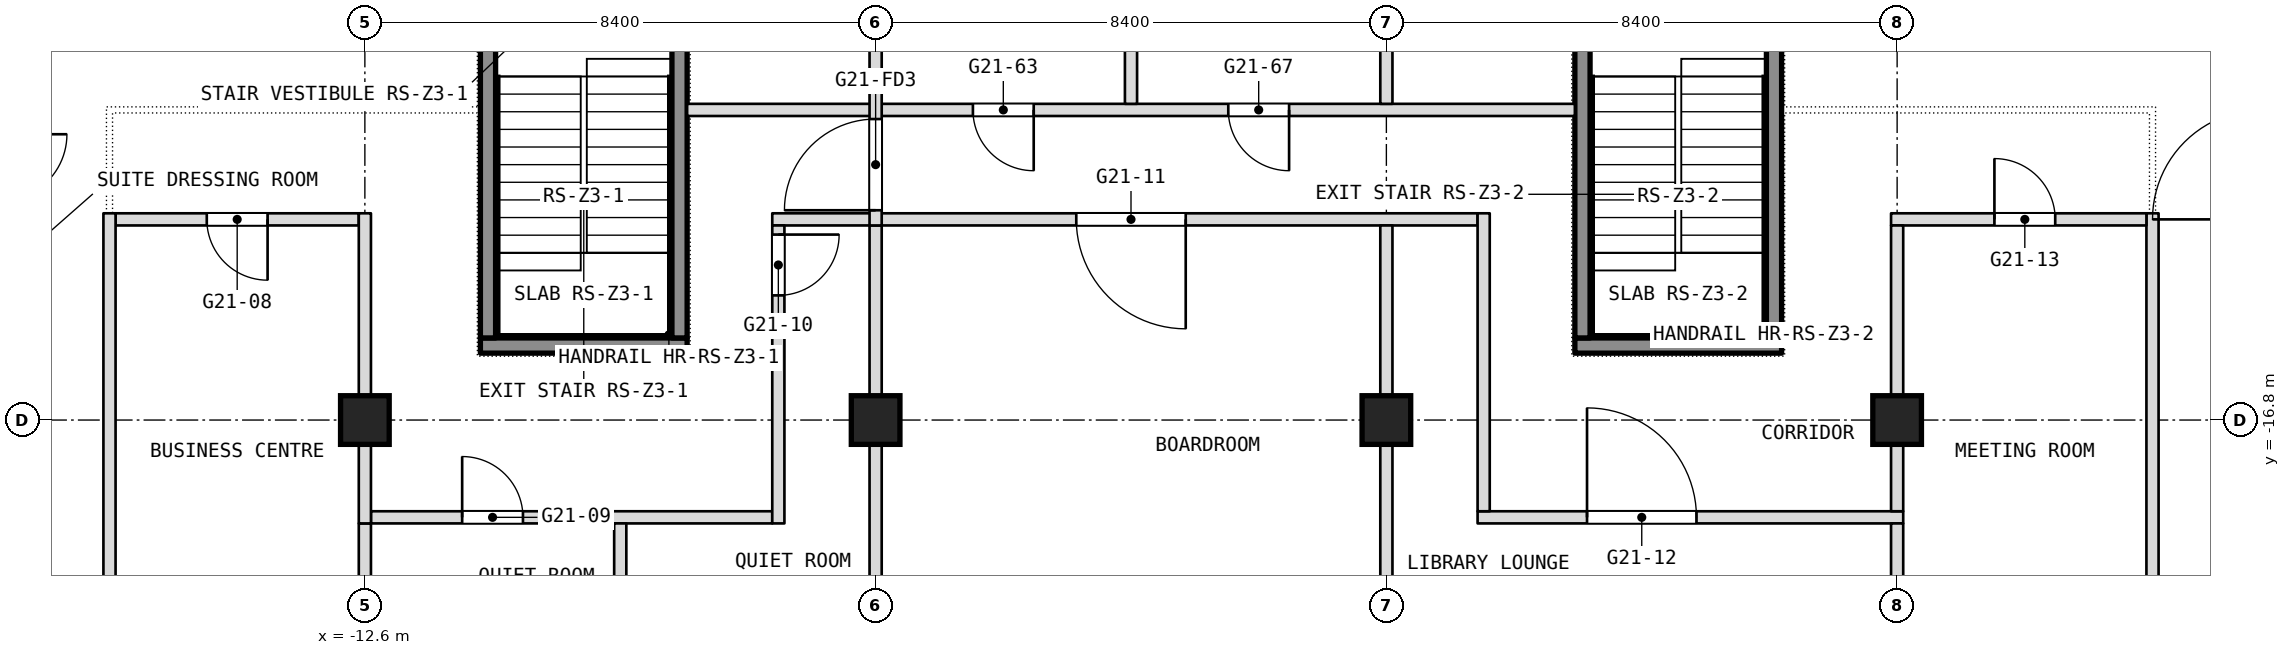
"""IFC4 building model, lengths in metres.
Left out: names, types, materials, properties, quantities, classifications, styles, units other than length and angle.
Written with IfcOpenShell. Run it as: python <this file> out.ifc"""

import sys

from ifc_helpers import new_model, si_unit, direction, frame, frame_2d, origin, origin_2d, place, context, subcontext, project, spatial, rectangle, extrude, element, fill, save


model = new_model("IFC4")
c1 = context("Model", 3, precision=1e-05, world=origin(), true_north=direction((0.0, 1.0)))
c2 = subcontext(c1, "Body", "Model", "MODEL_VIEW")
j1 = project(units=[si_unit("LENGTHUNIT", "METRE"), si_unit("PLANEANGLEUNIT", "RADIAN")], contexts=[c1])
p1 = place(None, origin())
s1 = spatial("IfcSite", under=j1, at=p1, CompositionType="ELEMENT")
p2 = place(p1, origin())
s2 = spatial("IfcBuilding", under=s1, at=p2, CompositionType="ELEMENT")
p3 = place(p2, frame((0.0, 0.0, 241.7)))
s3 = spatial("IfcBuildingStorey", under=s2, at=p3, CompositionType="ELEMENT", Elevation=241.7)
for number, where, z_axis, x_axis in (
    (1, (-12.6, -16.8, 0.0), (0.0, 0.0, 1.0), (1.0, 0.0, 0.0)),
    (2, (-4.2, -16.8, 0.0), (0.0, 0.0, 1.0), (1.0, 0.0, 0.0)),
    (3, (4.2, -16.8, 0.0), (0.0, 0.0, 1.0), (1.0, 0.0, 0.0)),
    (4, (12.6, -16.8, 0.0), (0.0, 0.0, 1.0), (1.0, 0.0, 0.0)),
):
    element("IfcColumn", number, at=place(p3, frame(where, z_axis=z_axis, x_axis=x_axis)), inside=s3, PredefinedType="COLUMN", context=c2, shape_type="SweptSolid", body=[
        extrude(rectangle(XDim=0.8, YDim=0.8, at=origin_2d()), origin(), (0.0, 0.0, 1.0), 3.6),
    ])
p4 = place(p3, frame((-12.5, -18.4, 0.0), z_axis=(0.0, 0.0, 1.0), x_axis=(1.0, 0.0, 0.0)))
e5 = element("IfcWall", 5, at=p4, inside=s3, PredefinedType="PARTITIONING", context=c2, shape_type="SweptSolid", body=[
    extrude(rectangle(XDim=6.6, YDim=0.2, at=frame_2d((3.3, 0.0))), origin(), (0.0, 0.0, 1.0), 3.34),
])
p5 = place(p4, frame((1.5, 0.0, 0.0)))
e6 = element("IfcOpeningElement", 6, at=p5, cuts=e5, PredefinedType="OPENING", context=c2, shape_type="SweptSolid", body=[
    extrude(rectangle(XDim=1.0, YDim=2.1, at=frame_2d((0.5, 1.05))), frame((0.0, 0.1, 0.0), z_axis=(0.0, -1.0, 0.0), x_axis=(1.0, 0.0, 0.0)), (0.0, 0.0, 1.0), 0.2),
])
p6 = place(p3, frame((5.7, -18.4, 0.0), z_axis=(0.0, 0.0, 1.0), x_axis=(1.0, 0.0, 0.0)))
e7 = element("IfcWall", 7, at=p6, inside=s3, PredefinedType="PARTITIONING", context=c2, shape_type="SweptSolid", body=[
    extrude(rectangle(XDim=7.0, YDim=0.2, at=frame_2d((3.5, 0.0))), origin(), (0.0, 0.0, 1.0), 3.34),
])
p7 = place(p6, frame((1.8, 0.0, 0.0)))
e8 = element("IfcOpeningElement", 8, at=p7, cuts=e7, PredefinedType="OPENING", context=c2, shape_type="SweptSolid", body=[
    extrude(rectangle(XDim=1.8, YDim=2.1, at=frame_2d((0.9, 1.05))), frame((0.0, 0.1, 0.0), z_axis=(0.0, -1.0, 0.0), x_axis=(1.0, 0.0, 0.0)), (0.0, 0.0, 1.0), 0.2),
])
p8 = place(p3, frame((16.8, -20.2, 0.0), z_axis=(0.0, 0.0, 1.0), x_axis=(0.0, 1.0, 0.0)))
e9 = element("IfcWall", 9, at=p8, inside=s3, PredefinedType="PARTITIONING", context=c2, shape_type="SweptSolid", body=[
    extrude(rectangle(XDim=6.8, YDim=0.2, at=frame_2d((3.4, 0.0))), origin(), (0.0, 0.0, 1.0), 3.34),
])
p9 = place(p3, frame((-16.7, -13.5, 0.0), z_axis=(0.0, 0.0, 1.0), x_axis=(1.0, 0.0, 0.0)))
e10 = element("IfcWall", 10, at=p9, inside=s3, PredefinedType="PARTITIONING", context=c2, shape_type="SweptSolid", body=[
    extrude(rectangle(XDim=4.0, YDim=0.2, at=frame_2d((2.0, 0.0))), origin(), (0.0, 0.0, 1.0), 3.34),
])
p10 = place(p9, frame((1.5, 0.0, 0.0)))
e11 = element("IfcOpeningElement", 11, at=p10, cuts=e10, PredefinedType="OPENING", context=c2, shape_type="SweptSolid", body=[
    extrude(rectangle(XDim=1.0, YDim=2.1, at=frame_2d((0.5, 1.05))), frame((0.0, 0.1, 0.0), z_axis=(0.0, -1.0, 0.0), x_axis=(1.0, 0.0, 0.0)), (0.0, 0.0, 1.0), 0.2),
])
p11 = place(p3, frame((-5.9, -13.5, 0.0), z_axis=(0.0, 0.0, 1.0), x_axis=(1.0, 0.0, 0.0)))
e12 = element("IfcWall", 12, at=p11, inside=s3, PredefinedType="PARTITIONING", context=c2, shape_type="SweptSolid", body=[
    extrude(rectangle(XDim=11.6, YDim=0.2, at=frame_2d((5.8, 0.0))), origin(), (0.0, 0.0, 1.0), 3.34),
])
p12 = place(p11, frame((5.0, 0.0, 0.0)))
e13 = element("IfcOpeningElement", 13, at=p12, cuts=e12, PredefinedType="OPENING", context=c2, shape_type="SweptSolid", body=[
    extrude(rectangle(XDim=1.8, YDim=2.1, at=frame_2d((0.9, 1.05))), frame((0.0, 0.1, 0.0), z_axis=(0.0, -1.0, 0.0), x_axis=(1.0, 0.0, 0.0)), (0.0, 0.0, 1.0), 0.2),
])
p13 = place(p3, frame((12.5, -13.5, 0.0), z_axis=(0.0, 0.0, 1.0), x_axis=(1.0, 0.0, 0.0)))
e14 = element("IfcWall", 14, at=p13, inside=s3, PredefinedType="PARTITIONING", context=c2, shape_type="SweptSolid", body=[
    extrude(rectangle(XDim=4.2, YDim=0.2, at=frame_2d((2.1, 0.0))), origin(), (0.0, 0.0, 1.0), 3.34),
])
p14 = place(p13, frame((1.7, 0.0, 0.0)))
e15 = element("IfcOpeningElement", 15, at=p14, cuts=e14, PredefinedType="OPENING", context=c2, shape_type="SweptSolid", body=[
    extrude(rectangle(XDim=1.0, YDim=2.1, at=frame_2d((0.5, 1.05))), frame((0.0, 0.1, 0.0), z_axis=(0.0, -1.0, 0.0), x_axis=(1.0, 0.0, 0.0)), (0.0, 0.0, 1.0), 0.2),
])
p15 = place(p3, frame((12.6, -20.0, 0.0), z_axis=(0.0, 0.0, 1.0), x_axis=(0.0, 1.0, 0.0)))
e16 = element("IfcWall", 16, at=p15, inside=s3, PredefinedType="PARTITIONING", context=c2, shape_type="SweptSolid", body=[
    extrude(rectangle(XDim=1.5, YDim=0.2, at=frame_2d((0.75, 0.0))), origin(), (0.0, 0.0, 1.0), 3.34),
])
p16 = place(p3, frame((12.6, -18.3, 0.0), z_axis=(0.0, 0.0, 1.0), x_axis=(0.0, 1.0, 0.0)))
e17 = element("IfcWall", 17, at=p16, inside=s3, PredefinedType="PARTITIONING", context=c2, shape_type="SweptSolid", body=[
    extrude(rectangle(XDim=4.7, YDim=0.2, at=frame_2d((2.35, 0.0))), origin(), (0.0, 0.0, 1.0), 3.34),
])
p17 = place(p3, frame((-7.3, -11.7, 0.0), z_axis=(0.0, 0.0, 1.0), x_axis=(1.0, 0.0, 0.0)))
e18 = element("IfcWall", 18, at=p17, inside=s3, PredefinedType="PARTITIONING", context=c2, shape_type="SweptSolid", body=[
    extrude(rectangle(XDim=14.6, YDim=0.2, at=frame_2d((7.3, 0.0))), origin(), (0.0, 0.0, 1.0), 3.34),
])
p18 = place(p17, frame((4.7, 0.0, 0.0)))
e19 = element("IfcOpeningElement", 19, at=p18, cuts=e18, PredefinedType="OPENING", context=c2, shape_type="SweptSolid", body=[
    extrude(rectangle(XDim=1.0, YDim=2.1, at=frame_2d((0.5, 1.05))), frame((0.0, 0.1, 0.0), z_axis=(0.0, -1.0, 0.0), x_axis=(1.0, 0.0, 0.0)), (0.0, 0.0, 1.0), 0.2),
])
p19 = place(p17, frame((8.9, 0.0, 0.0)))
e20 = element("IfcOpeningElement", 20, at=p19, cuts=e18, PredefinedType="OPENING", context=c2, shape_type="SweptSolid", body=[
    extrude(rectangle(XDim=1.0, YDim=2.1, at=frame_2d((0.5, 1.05))), frame((0.0, 0.1, 0.0), z_axis=(0.0, -1.0, 0.0), x_axis=(1.0, 0.0, 0.0)), (0.0, 0.0, 1.0), 0.2),
])
p20 = place(p3, frame((5.8, -18.3, 0.0), z_axis=(0.0, 0.0, 1.0), x_axis=(0.0, 1.0, 0.0)))
e21 = element("IfcWall", 21, at=p20, inside=s3, PredefinedType="PARTITIONING", context=c2, shape_type="SweptSolid", body=[
    extrude(rectangle(XDim=4.9, YDim=0.2, at=frame_2d((2.45, 0.0))), origin(), (0.0, 0.0, 1.0), 3.34),
])
p21 = place(p3, frame((4.2, -20.0, 0.0), z_axis=(0.0, 0.0, 1.0), x_axis=(0.0, 1.0, 0.0)))
e22 = element("IfcWall", 22, at=p21, inside=s3, PredefinedType="PARTITIONING", context=c2, shape_type="SweptSolid", body=[
    extrude(rectangle(XDim=6.4, YDim=0.2, at=frame_2d((3.2, 0.0))), origin(), (0.0, 0.0, 1.0), 3.34),
])
for number, where, z_axis, x_axis in (
    (23, (4.2, -11.6, 0.0), (0.0, 0.0, 1.0), (0.0, 1.0, 0.0)),
    (24, (0.0, -11.6, 0.0), (0.0, 0.0, 1.0), (0.0, 1.0, 0.0)),
):
    element("IfcWall", number, at=place(p3, frame(where, z_axis=z_axis, x_axis=x_axis)), inside=s3, PredefinedType="PARTITIONING", context=c2, shape_type="SweptSolid", body=[
        extrude(rectangle(XDim=9.7, YDim=0.2, at=frame_2d((4.85, 0.0))), origin(), (0.0, 0.0, 1.0), 3.34),
    ])
p22 = place(p3, frame((-4.2, -22.0, 0.0), z_axis=(0.0, 0.0, 1.0), x_axis=(0.0, 1.0, 0.0)))
e25 = element("IfcWall", 25, at=p22, inside=s3, PredefinedType="PARTITIONING", context=c2, shape_type="SweptSolid", body=[
    extrude(rectangle(XDim=8.4, YDim=0.2, at=frame_2d((4.2, 0.0))), origin(), (0.0, 0.0, 1.0), 3.34),
])
p23 = place(p22, frame((0.25, 0.0, 0.0)))
e26 = element("IfcOpeningElement", 26, at=p23, cuts=e25, PredefinedType="OPENING", context=c2, shape_type="SweptSolid", body=[
    extrude(rectangle(XDim=1.5, YDim=2.1, at=frame_2d((0.75, 1.05))), frame((0.0, 0.1, 0.0), z_axis=(0.0, -1.0, 0.0), x_axis=(1.0, 0.0, 0.0)), (0.0, 0.0, 1.0), 0.2),
])
p24 = place(p3, frame((-4.2, -13.6, 0.0), z_axis=(0.0, 0.0, 1.0), x_axis=(0.0, 1.0, 0.0)))
e27 = element("IfcWall", 27, at=p24, inside=s3, PredefinedType="PARTITIONING", context=c2, shape_type="SweptSolid", body=[
    extrude(rectangle(XDim=13.6, YDim=0.2, at=frame_2d((6.8, 0.0))), origin(), (0.0, 0.0, 1.0), 3.34),
])
p25 = place(p24, frame((11.95, 0.0, 0.0)))
e28 = element("IfcOpeningElement", 28, at=p25, cuts=e27, PredefinedType="OPENING", context=c2, shape_type="SweptSolid", body=[
    extrude(rectangle(XDim=1.5, YDim=2.1, at=frame_2d((0.75, 1.05))), frame((0.0, 0.1, 0.0), z_axis=(0.0, -1.0, 0.0), x_axis=(1.0, 0.0, 0.0)), (0.0, 0.0, 1.0), 0.2),
])
p26 = place(p24, frame((0.25, 0.0, 0.0)))
e29 = element("IfcOpeningElement", 29, at=p26, cuts=e27, PredefinedType="OPENING", context=c2, shape_type="SweptSolid", body=[
    extrude(rectangle(XDim=1.5, YDim=2.1, at=frame_2d((0.75, 1.05))), frame((0.0, 0.1, 0.0), z_axis=(0.0, -1.0, 0.0), x_axis=(1.0, 0.0, 0.0)), (0.0, 0.0, 1.0), 0.2),
])
p27 = place(p3, frame((-5.8, -18.5, 0.0), z_axis=(0.0, 0.0, 1.0), x_axis=(0.0, 1.0, 0.0)))
e30 = element("IfcWall", 30, at=p27, inside=s3, PredefinedType="PARTITIONING", context=c2, shape_type="SweptSolid", body=[
    extrude(rectangle(XDim=4.9, YDim=0.2, at=frame_2d((2.45, 0.0))), origin(), (0.0, 0.0, 1.0), 3.34),
])
p28 = place(p27, frame((3.75, 0.0, 0.0)))
e31 = element("IfcOpeningElement", 31, at=p28, cuts=e30, PredefinedType="OPENING", context=c2, shape_type="SweptSolid", body=[
    extrude(rectangle(XDim=1.0, YDim=2.1, at=frame_2d((0.5, 1.05))), frame((0.0, 0.1, 0.0), z_axis=(0.0, -1.0, 0.0), x_axis=(1.0, 0.0, 0.0)), (0.0, 0.0, 1.0), 0.2),
])
for number, where, z_axis, x_axis in (
    (32, (-8.4, -20.0, 0.0), (0.0, 0.0, 1.0), (0.0, 1.0, 0.0)),
    (33, (-12.6, -20.0, 0.0), (0.0, 0.0, 1.0), (0.0, 1.0, 0.0)),
):
    element("IfcWall", number, at=place(p3, frame(where, z_axis=z_axis, x_axis=x_axis)), inside=s3, PredefinedType="PARTITIONING", context=c2, shape_type="SweptSolid", body=[
        extrude(rectangle(XDim=1.5, YDim=0.2, at=frame_2d((0.75, 0.0))), origin(), (0.0, 0.0, 1.0), 3.34),
    ])
p29 = place(p3, frame((-12.6, -18.5, 0.0), z_axis=(0.0, 0.0, 1.0), x_axis=(0.0, 1.0, 0.0)))
e34 = element("IfcWall", 34, at=p29, inside=s3, PredefinedType="PARTITIONING", context=c2, shape_type="SweptSolid", body=[
    extrude(rectangle(XDim=5.1, YDim=0.2, at=frame_2d((2.55, 0.0))), origin(), (0.0, 0.0, 1.0), 3.34),
])
p30 = place(p3, frame((-16.8, -20.2, 0.0), z_axis=(0.0, 0.0, 1.0), x_axis=(0.0, 1.0, 0.0)))
e35 = element("IfcWall", 35, at=p30, inside=s3, PredefinedType="PARTITIONING", context=c2, shape_type="SweptSolid", body=[
    extrude(rectangle(XDim=6.8, YDim=0.2, at=frame_2d((3.4, 0.0))), origin(), (0.0, 0.0, 1.0), 3.34),
])
p31 = place(p3, frame((-10.7, -15.575, 0.1), z_axis=(0.0, 0.0, 1.0), x_axis=(1.0, 0.0, 0.0)))
e36 = element("IfcWall", 36, at=p31, inside=s3, PredefinedType="SHEAR", context=c2, shape_type="SweptSolid", body=[
    extrude(rectangle(XDim=3.4, YDim=0.25, at=frame_2d((1.7, 0.0))), origin(), (0.0, 0.0, 1.0), 3.6),
])
for number, where, z_axis, x_axis in (
    (37, (-10.575, -15.45, 0.1), (0.0, 0.0, 1.0), (0.0, 1.0, 0.0)),
    (38, (-7.425, -15.45, 0.1), (0.0, 0.0, 1.0), (0.0, 1.0, 0.0)),
):
    element("IfcWall", number, at=place(p3, frame(where, z_axis=z_axis, x_axis=x_axis)), inside=s3, PredefinedType="SHEAR", context=c2, shape_type="SweptSolid", body=[
        extrude(rectangle(XDim=5.7, YDim=0.25, at=frame_2d((2.85, 0.0))), origin(), (0.0, 0.0, 1.0), 3.6),
    ])
p32 = place(p3, frame((7.3, -15.575, 0.1), z_axis=(0.0, 0.0, 1.0), x_axis=(1.0, 0.0, 0.0)))
e39 = element("IfcWall", 39, at=p32, inside=s3, PredefinedType="SHEAR", context=c2, shape_type="SweptSolid", body=[
    extrude(rectangle(XDim=3.4, YDim=0.25, at=frame_2d((1.7, 0.0))), origin(), (0.0, 0.0, 1.0), 3.6),
])
for number, where, z_axis, x_axis in (
    (40, (7.425, -15.45, 0.1), (0.0, 0.0, 1.0), (0.0, 1.0, 0.0)),
    (41, (10.575, -15.45, 0.1), (0.0, 0.0, 1.0), (0.0, 1.0, 0.0)),
):
    element("IfcWall", number, at=place(p3, frame(where, z_axis=z_axis, x_axis=x_axis)), inside=s3, PredefinedType="SHEAR", context=c2, shape_type="SweptSolid", body=[
        extrude(rectangle(XDim=5.7, YDim=0.25, at=frame_2d((2.85, 0.0))), origin(), (0.0, 0.0, 1.0), 3.6),
    ])
p33 = place(p5, origin())
e42 = element("IfcDoor", 42, at=p33, inside=s3, OperationType="SINGLE_SWING_RIGHT", PredefinedType="DOOR", context=c2, shape_type="SweptSolid", body=[
    extrude(rectangle(XDim=1.0, YDim=2.1, at=frame_2d((0.5, 1.05))), frame((0.0, 0.025, 0.0), z_axis=(0.0, -1.0, 0.0), x_axis=(1.0, 0.0, 0.0)), (0.0, 0.0, 1.0), 0.05),
])
fill(e6, e42)
p34 = place(p7, origin())
e43 = element("IfcDoor", 43, at=p34, inside=s3, OperationType="DOUBLE_DOOR_SINGLE_SWING", PredefinedType="DOOR", context=c2, shape_type="SweptSolid", body=[
    extrude(rectangle(XDim=1.8, YDim=2.1, at=frame_2d((0.9, 1.05))), frame((0.0, 0.025, 0.0), z_axis=(0.0, -1.0, 0.0), x_axis=(1.0, 0.0, 0.0)), (0.0, 0.0, 1.0), 0.05),
])
fill(e8, e43)
p35 = place(p10, origin())
e44 = element("IfcDoor", 44, at=p35, inside=s3, OperationType="SINGLE_SWING_RIGHT", PredefinedType="DOOR", context=c2, shape_type="SweptSolid", body=[
    extrude(rectangle(XDim=1.0, YDim=2.1, at=frame_2d((0.5, 1.05))), frame((0.0, 0.025, 0.0), z_axis=(0.0, -1.0, 0.0), x_axis=(1.0, 0.0, 0.0)), (0.0, 0.0, 1.0), 0.05),
])
fill(e11, e44)
p36 = place(p12, origin())
e45 = element("IfcDoor", 45, at=p36, inside=s3, OperationType="DOUBLE_DOOR_SINGLE_SWING", PredefinedType="DOOR", context=c2, shape_type="SweptSolid", body=[
    extrude(rectangle(XDim=1.8, YDim=2.1, at=frame_2d((0.9, 1.05))), frame((0.0, 0.025, 0.0), z_axis=(0.0, -1.0, 0.0), x_axis=(1.0, 0.0, 0.0)), (0.0, 0.0, 1.0), 0.05),
])
fill(e13, e45)
p37 = place(p14, origin())
e46 = element("IfcDoor", 46, at=p37, inside=s3, OperationType="SINGLE_SWING_LEFT", PredefinedType="DOOR", context=c2, shape_type="SweptSolid", body=[
    extrude(rectangle(XDim=1.0, YDim=2.1, at=frame_2d((0.5, 1.05))), frame((0.0, 0.025, 0.0), z_axis=(0.0, -1.0, 0.0), x_axis=(1.0, 0.0, 0.0)), (0.0, 0.0, 1.0), 0.05),
])
fill(e15, e46)
p38 = place(p18, origin())
e47 = element("IfcDoor", 47, at=p38, inside=s3, OperationType="SINGLE_SWING_LEFT", PredefinedType="DOOR", context=c2, shape_type="SweptSolid", body=[
    extrude(rectangle(XDim=1.0, YDim=2.1, at=frame_2d((0.5, 1.05))), frame((0.0, 0.025, 0.0), z_axis=(0.0, -1.0, 0.0), x_axis=(1.0, 0.0, 0.0)), (0.0, 0.0, 1.0), 0.05),
])
fill(e19, e47)
p39 = place(p19, origin())
e48 = element("IfcDoor", 48, at=p39, inside=s3, OperationType="SINGLE_SWING_LEFT", PredefinedType="DOOR", context=c2, shape_type="SweptSolid", body=[
    extrude(rectangle(XDim=1.0, YDim=2.1, at=frame_2d((0.5, 1.05))), frame((0.0, 0.025, 0.0), z_axis=(0.0, -1.0, 0.0), x_axis=(1.0, 0.0, 0.0)), (0.0, 0.0, 1.0), 0.05),
])
fill(e20, e48)
p40 = place(p28, origin())
e49 = element("IfcDoor", 49, at=p40, inside=s3, OperationType="SINGLE_SWING_RIGHT", PredefinedType="DOOR", context=c2, shape_type="SweptSolid", body=[
    extrude(rectangle(XDim=1.0, YDim=2.1, at=frame_2d((0.5, 1.05))), frame((0.0, 0.025, 0.0), z_axis=(0.0, -1.0, 0.0), x_axis=(1.0, 0.0, 0.0)), (0.0, 0.0, 1.0), 0.05),
])
fill(e31, e49)
p41 = place(p26, origin())
e50 = element("IfcDoor", 50, at=p41, inside=s3, OperationType="DOUBLE_DOOR_DOUBLE_SWING", PredefinedType="DOOR", context=c2, shape_type="SweptSolid", body=[
    extrude(rectangle(XDim=1.5, YDim=2.1, at=frame_2d((0.75, 1.05))), frame((0.0, 0.025, 0.0), z_axis=(0.0, -1.0, 0.0), x_axis=(1.0, 0.0, 0.0)), (0.0, 0.0, 1.0), 0.05),
])
fill(e29, e50)
save(model, sys.argv[1])
